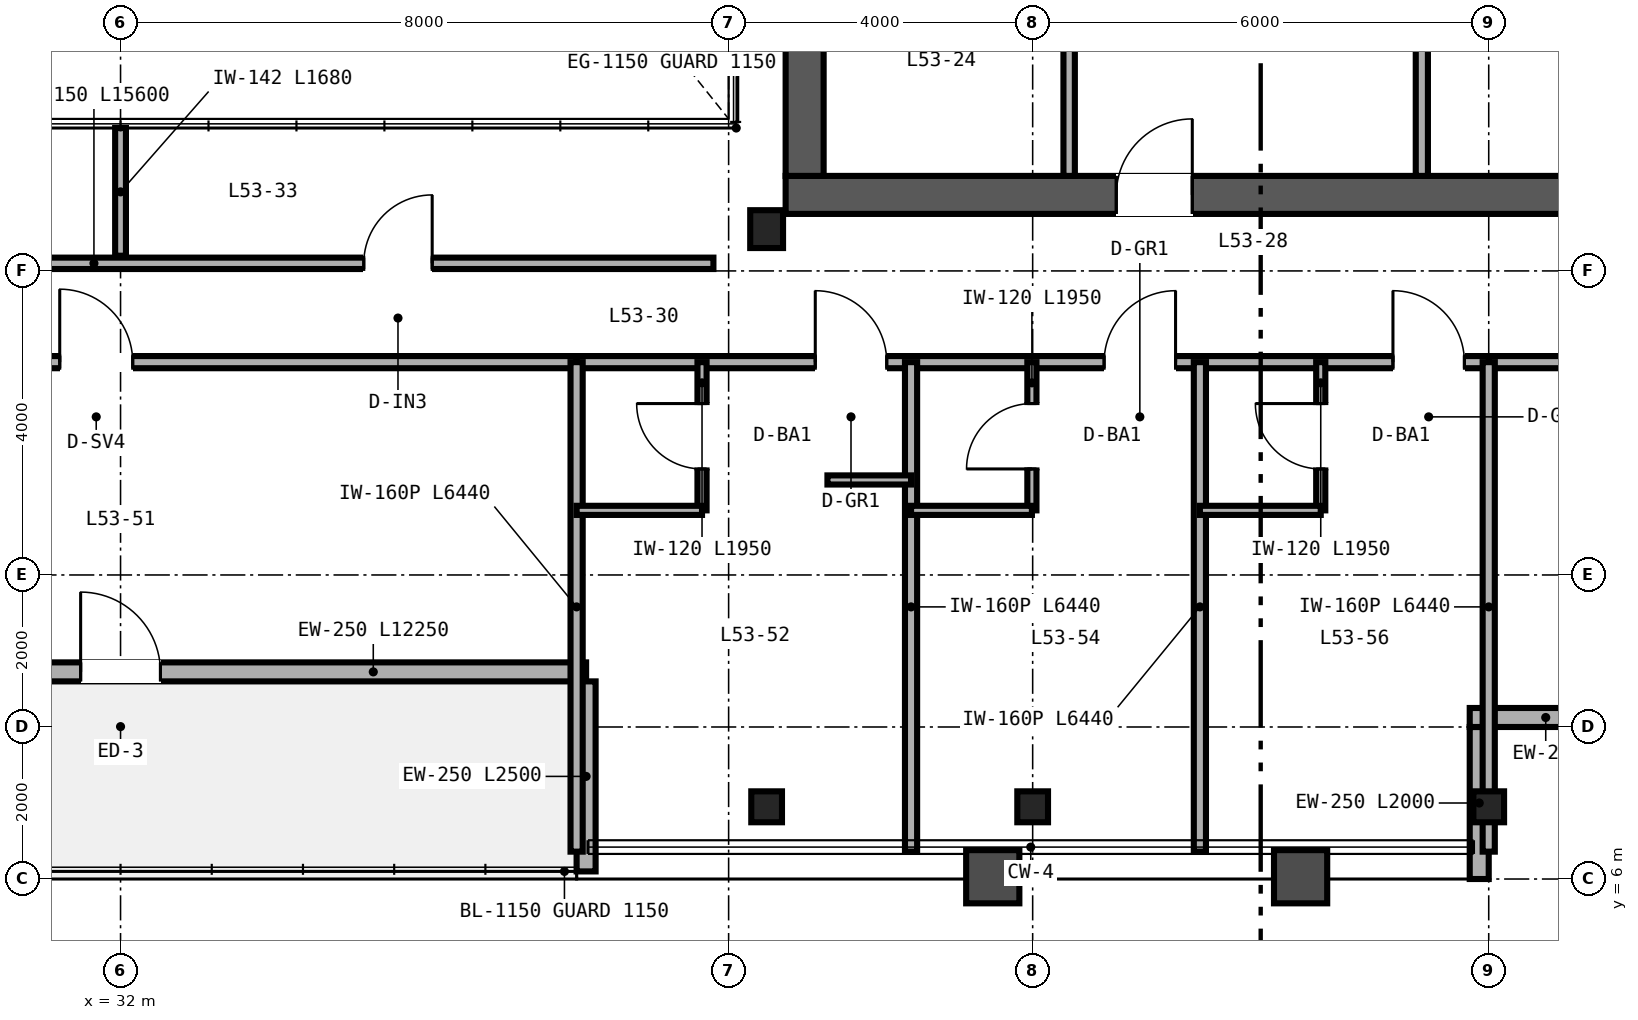
"""IFC4 building model, lengths in metres.
Left out: names, types, materials, properties, quantities, classifications, styles, units other than length and angle.
Written with IfcOpenShell. Run it as: python <this file> out.ifc"""

import sys

from ifc_helpers import new_model, si_unit, direction, frame, frame_2d, origin, origin_2d, place, context, subcontext, project, spatial, rectangle, i_section, extrude, source, transform, mapped, element, fill, save


model = new_model("IFC4")
c1 = context("Model", 3, precision=1e-05, world=origin(), true_north=direction((0.0, 1.0)))
c2 = subcontext(c1, "Body", "Model", "MODEL_VIEW")
j1 = project(units=[si_unit("LENGTHUNIT", "METRE"), si_unit("PLANEANGLEUNIT", "RADIAN")], contexts=[c1])
p1 = place(None, origin())
s1 = spatial("IfcSite", under=j1, at=p1, CompositionType="ELEMENT")
p2 = place(p1, origin())
s2 = spatial("IfcBuilding", under=s1, at=p2, CompositionType="ELEMENT")
p3 = place(p2, frame((0.0, 0.0, 210.0)))
s3 = spatial("IfcBuildingStorey", under=s2, at=p3, CompositionType="ELEMENT", Elevation=210.0)
p4 = place(p3, frame((40.75, 15.0, 0.0), z_axis=(0.0, 0.0, 1.0), x_axis=(1.0, 0.0, 0.0)))
e1 = element("IfcWall", 1, at=p4, inside=s3, PredefinedType="SHEAR", context=c2, shape_type="SweptSolid", body=[
    extrude(rectangle(XDim=12.5, YDim=0.5, at=frame_2d((6.25, 0.0))), origin(), (0.0, 0.0, 1.0), 3.37),
])
p5 = place(p4, frame((4.35, 0.0, 0.0)))
e2 = element("IfcOpeningElement", 2, at=p5, cuts=e1, PredefinedType="OPENING", context=c2, shape_type="SweptSolid", body=[
    extrude(rectangle(XDim=1.0, YDim=2.15, at=frame_2d((0.5, 1.075))), frame((0.0, 0.26, 0.0), z_axis=(0.0, -1.0, 0.0), x_axis=(1.0, 0.0, 0.0)), (0.0, 0.0, 1.0), 0.52),
])
p6 = place(p3, frame((41.0, 15.25, 0.0), z_axis=(0.0, 0.0, 1.0), x_axis=(0.0, 1.0, 0.0)))
e3 = element("IfcWall", 3, at=p6, inside=s3, PredefinedType="SHEAR", context=c2, shape_type="SweptSolid", body=[
    extrude(rectangle(XDim=21.5, YDim=0.5, at=frame_2d((10.75, 0.0))), origin(), (0.0, 0.0, 1.0), 3.37),
])
m1 = source(origin(), c2, "Body", "SweptSolid", [
    extrude(i_section(OverallWidth=0.432, OverallDepth=0.498, WebThickness=0.056, FlangeThickness=0.089, FilletRadius=0.025, at=origin_2d()), origin(), (0.0, 0.0, 1.0), 3.37),
])
p7 = place(p3, frame((40.5, 14.55, 0.0), z_axis=(0.0, 0.0, 1.0), x_axis=(1.0, 0.0, 0.0)))
e4 = element("IfcColumn", 4, at=p7, inside=s3, PredefinedType="COLUMN", context=c2, shape_type="MappedRepresentation", body=[
    mapped(m1, transform((0.0, 0.0, 0.0), scale=1.0)),
])
m2 = source(origin(), c2, "Body", "SweptSolid", [
    extrude(i_section(OverallWidth=0.404, OverallDepth=0.407, WebThickness=0.027, FlangeThickness=0.044, FilletRadius=0.025, at=origin_2d()), origin(), (0.0, 0.0, 1.0), 3.37),
])
for number, where, z_axis, x_axis in (
    (5, (40.5, 6.95, 0.0), (0.0, 0.0, 1.0), (1.0, 0.0, 0.0)),
    (6, (44.0, 6.95, 0.0), (0.0, 0.0, 1.0), (1.0, 0.0, 0.0)),
    (7, (50.0, 6.95, 0.0), (0.0, 0.0, 1.0), (1.0, 0.0, 0.0)),
):
    element("IfcColumn", number, at=place(p3, frame(where, z_axis=z_axis, x_axis=x_axis)), inside=s3, PredefinedType="COLUMN", context=c2, shape_type="MappedRepresentation", body=[
        mapped(m2, transform((0.0, 0.0, 0.0), scale=1.0)),
    ])
p8 = place(p3, frame((49.875, 6.0, 0.0), z_axis=(0.0, 0.0, 1.0), x_axis=(0.0, 1.0, 0.0)))
e8 = element("IfcWall", 8, at=p8, inside=s3, PredefinedType="SOLIDWALL", context=c2, shape_type="SweptSolid", body=[
    extrude(rectangle(XDim=2.0, YDim=0.25, at=frame_2d((1.0, 0.0))), origin(), (0.0, 0.0, 1.0), 2.677),
])
p9 = place(p3, frame((49.75, 8.125, 0.0), z_axis=(0.0, 0.0, 1.0), x_axis=(1.0, 0.0, 0.0)))
e9 = element("IfcWall", 9, at=p9, inside=s3, PredefinedType="SOLIDWALL", context=c2, shape_type="SweptSolid", body=[
    extrude(rectangle(XDim=2.0, YDim=0.25, at=frame_2d((1.0, 0.0))), origin(), (0.0, 0.0, 1.0), 3.37),
])
p10 = place(p3, frame((25.875, 8.725, 0.0), z_axis=(0.0, 0.0, 1.0), x_axis=(1.0, 0.0, 0.0)))
e10 = element("IfcWall", 10, at=p10, inside=s3, PredefinedType="SOLIDWALL", context=c2, shape_type="SweptSolid", body=[
    extrude(rectangle(XDim=12.25, YDim=0.25, at=frame_2d((6.125, 0.0))), origin(), (0.0, 0.0, 1.0), 3.37),
])
p11 = place(p10, frame((5.6, 0.0, 0.0)))
e11 = element("IfcOpeningElement", 11, at=p11, cuts=e10, PredefinedType="OPENING", context=c2, shape_type="SweptSolid", body=[
    extrude(rectangle(XDim=1.05, YDim=2.15, at=frame_2d((0.525, 1.075))), frame((0.0, 0.135, 0.0), z_axis=(0.0, -1.0, 0.0), x_axis=(1.0, 0.0, 0.0)), (0.0, 0.0, 1.0), 0.27),
])
p12 = place(p3, frame((38.125, 6.1, 0.0), z_axis=(0.0, 0.0, 1.0), x_axis=(0.0, 1.0, 0.0)))
e12 = element("IfcWall", 12, at=p12, inside=s3, PredefinedType="SOLIDWALL", context=c2, shape_type="SweptSolid", body=[
    extrude(rectangle(XDim=2.5, YDim=0.25, at=frame_2d((1.25, 0.0))), origin(), (0.0, 0.0, 1.0), 2.443),
])
p13 = place(p3, frame((49.12, 15.25, 0.0), z_axis=(0.0, 0.0, 1.0), x_axis=(0.0, 1.0, 0.0)))
e13 = element("IfcWall", 13, at=p13, inside=s3, PredefinedType="PARTITIONING", context=c2, shape_type="SweptSolid", body=[
    extrude(rectangle(XDim=16.13, YDim=0.16, at=frame_2d((8.065, 0.0))), origin(), (0.0, 0.0, 1.0), 2.443),
])
p14 = place(p13, frame((2.2, 0.0, 0.0)))
e14 = element("IfcOpeningElement", 14, at=p14, cuts=e13, PredefinedType="OPENING", context=c2, shape_type="SweptSolid", body=[
    extrude(rectangle(XDim=0.9, YDim=2.15, at=frame_2d((0.45, 1.075))), frame((0.0, 0.09, 0.0), z_axis=(0.0, -1.0, 0.0), x_axis=(1.0, 0.0, 0.0)), (0.0, 0.0, 1.0), 0.18),
])
p15 = place(p13, frame((8.2, 0.0, 0.0)))
e15 = element("IfcOpeningElement", 15, at=p15, cuts=e13, PredefinedType="OPENING", context=c2, shape_type="SweptSolid", body=[
    extrude(rectangle(XDim=0.9, YDim=2.15, at=frame_2d((0.45, 1.075))), frame((0.0, 0.09, 0.0), z_axis=(0.0, -1.0, 0.0), x_axis=(1.0, 0.0, 0.0)), (0.0, 0.0, 1.0), 0.18),
])
p16 = place(p13, frame((13.5, 0.0, 0.0)))
e16 = element("IfcOpeningElement", 16, at=p16, cuts=e13, PredefinedType="OPENING", context=c2, shape_type="SweptSolid", body=[
    extrude(rectangle(XDim=0.9, YDim=2.15, at=frame_2d((0.45, 1.075))), frame((0.0, 0.09, 0.0), z_axis=(0.0, -1.0, 0.0), x_axis=(1.0, 0.0, 0.0)), (0.0, 0.0, 1.0), 0.18),
])
p17 = place(p3, frame((44.48, 15.25, 0.0), z_axis=(0.0, 0.0, 1.0), x_axis=(0.0, 1.0, 0.0)))
e17 = element("IfcWall", 17, at=p17, inside=s3, PredefinedType="PARTITIONING", context=c2, shape_type="SweptSolid", body=[
    extrude(rectangle(XDim=11.63, YDim=0.15, at=frame_2d((5.815, 0.0))), origin(), (0.0, 0.0, 1.0), 3.37),
])
p18 = place(p17, frame((2.2, 0.0, 0.0)))
e18 = element("IfcOpeningElement", 18, at=p18, cuts=e17, PredefinedType="OPENING", context=c2, shape_type="SweptSolid", body=[
    extrude(rectangle(XDim=0.9, YDim=2.15, at=frame_2d((0.45, 1.075))), frame((0.0, 0.085, 0.0), z_axis=(0.0, -1.0, 0.0), x_axis=(1.0, 0.0, 0.0)), (0.0, 0.0, 1.0), 0.17),
])
p19 = place(p17, frame((7.87, 0.0, 0.0)))
e19 = element("IfcOpeningElement", 19, at=p19, cuts=e17, PredefinedType="OPENING", context=c2, shape_type="SweptSolid", body=[
    extrude(rectangle(XDim=0.9, YDim=2.15, at=frame_2d((0.45, 1.075))), frame((0.0, 0.085, 0.0), z_axis=(0.0, -1.0, 0.0), x_axis=(1.0, 0.0, 0.0)), (0.0, 0.0, 1.0), 0.17),
])
p20 = place(p3, frame((24.2, 14.1, 0.0), z_axis=(0.0, 0.0, 1.0), x_axis=(1.0, 0.0, 0.0)))
e20 = element("IfcWall", 20, at=p20, inside=s3, PredefinedType="PARTITIONING", context=c2, shape_type="SweptSolid", body=[
    extrude(rectangle(XDim=15.6, YDim=0.15, at=frame_2d((7.8, 0.0))), origin(), (0.0, 0.0, 1.0), 3.37),
])
p21 = place(p20, frame((3.0, 0.0, 0.0)))
e21 = element("IfcOpeningElement", 21, at=p21, cuts=e20, PredefinedType="OPENING", context=c2, shape_type="SweptSolid", body=[
    extrude(rectangle(XDim=0.9, YDim=2.15, at=frame_2d((0.45, 1.075))), frame((0.0, 0.085, 0.0), z_axis=(0.0, -1.0, 0.0), x_axis=(1.0, 0.0, 0.0)), (0.0, 0.0, 1.0), 0.17),
])
p22 = place(p20, frame((11.0, 0.0, 0.0)))
e22 = element("IfcOpeningElement", 22, at=p22, cuts=e20, PredefinedType="OPENING", context=c2, shape_type="SweptSolid", body=[
    extrude(rectangle(XDim=0.9, YDim=2.15, at=frame_2d((0.45, 1.075))), frame((0.0, 0.085, 0.0), z_axis=(0.0, -1.0, 0.0), x_axis=(1.0, 0.0, 0.0)), (0.0, 0.0, 1.0), 0.17),
])
p23 = place(p3, frame((32.0, 14.2, 0.0), z_axis=(0.0, 0.0, 1.0), x_axis=(0.0, 1.0, 0.0)))
e23 = element("IfcWall", 23, at=p23, inside=s3, PredefinedType="PARTITIONING", context=c2, shape_type="SweptSolid", body=[
    extrude(rectangle(XDim=1.68, YDim=0.142, at=frame_2d((0.84, 0.0))), origin(), (0.0, 0.0, 1.0), 3.37),
])
p24 = place(p3, frame((50.0, 12.8, 0.0), z_axis=(0.0, 0.0, 1.0), x_axis=(1.0, 0.0, 0.0)))
e24 = element("IfcWall", 24, at=p24, inside=s3, PredefinedType="PARTITIONING", context=c2, shape_type="SweptSolid", body=[
    extrude(rectangle(XDim=4.0, YDim=0.16, at=frame_2d((2.0, 0.0))), origin(), (0.0, 0.0, 1.0), 3.37),
])
p25 = place(p24, frame((1.52, 0.0, 0.0)))
e25 = element("IfcOpeningElement", 25, at=p25, cuts=e24, PredefinedType="OPENING", context=c2, shape_type="SweptSolid", body=[
    extrude(rectangle(XDim=0.96, YDim=2.15, at=frame_2d((0.48, 1.075))), frame((0.0, 0.09, 0.0), z_axis=(0.0, -1.0, 0.0), x_axis=(1.0, 0.0, 0.0)), (0.0, 0.0, 1.0), 0.18),
])
p26 = place(p3, frame((26.0, 12.8, 0.0), z_axis=(0.0, 0.0, 1.0), x_axis=(1.0, 0.0, 0.0)))
e26 = element("IfcWall", 26, at=p26, inside=s3, PredefinedType="PARTITIONING", context=c2, shape_type="SweptSolid", body=[
    extrude(rectangle(XDim=12.0, YDim=0.16, at=frame_2d((6.0, 0.0))), origin(), (0.0, 0.0, 1.0), 3.37),
])
p27 = place(p26, frame((5.2, 0.0, 0.0)))
e27 = element("IfcOpeningElement", 27, at=p27, cuts=e26, PredefinedType="OPENING", context=c2, shape_type="SweptSolid", body=[
    extrude(rectangle(XDim=0.96, YDim=2.15, at=frame_2d((0.48, 1.075))), frame((0.0, 0.09, 0.0), z_axis=(0.0, -1.0, 0.0), x_axis=(1.0, 0.0, 0.0)), (0.0, 0.0, 1.0), 0.18),
])
p28 = place(p3, frame((38.0, 12.8, 0.0), z_axis=(0.0, 0.0, 1.0), x_axis=(1.0, 0.0, 0.0)))
e28 = element("IfcWall", 28, at=p28, inside=s3, PredefinedType="PARTITIONING", context=c2, shape_type="SweptSolid", body=[
    extrude(rectangle(XDim=12.0, YDim=0.16, at=frame_2d((6.0, 0.0))), origin(), (0.0, 0.0, 1.0), 2.913),
])
p29 = place(p28, frame((3.14, 0.0, 0.0)))
e29 = element("IfcOpeningElement", 29, at=p29, cuts=e28, PredefinedType="OPENING", context=c2, shape_type="SweptSolid", body=[
    extrude(rectangle(XDim=0.94, YDim=2.15, at=frame_2d((0.47, 1.075))), frame((0.0, 0.09, 0.0), z_axis=(0.0, -1.0, 0.0), x_axis=(1.0, 0.0, 0.0)), (0.0, 0.0, 1.0), 0.18),
])
p30 = place(p28, frame((6.94, 0.0, 0.0)))
e30 = element("IfcOpeningElement", 30, at=p30, cuts=e28, PredefinedType="OPENING", context=c2, shape_type="SweptSolid", body=[
    extrude(rectangle(XDim=0.94, YDim=2.15, at=frame_2d((0.47, 1.075))), frame((0.0, 0.09, 0.0), z_axis=(0.0, -1.0, 0.0), x_axis=(1.0, 0.0, 0.0)), (0.0, 0.0, 1.0), 0.18),
])
p31 = place(p28, frame((10.74, 0.0, 0.0)))
e31 = element("IfcOpeningElement", 31, at=p31, cuts=e28, PredefinedType="OPENING", context=c2, shape_type="SweptSolid", body=[
    extrude(rectangle(XDim=0.94, YDim=2.15, at=frame_2d((0.47, 1.075))), frame((0.0, 0.09, 0.0), z_axis=(0.0, -1.0, 0.0), x_axis=(1.0, 0.0, 0.0)), (0.0, 0.0, 1.0), 0.18),
])
p32 = place(p3, frame((38.0, 6.36, 0.0), z_axis=(0.0, 0.0, 1.0), x_axis=(0.0, 1.0, 0.0)))
e32 = element("IfcWall", 32, at=p32, inside=s3, PredefinedType="PARTITIONING", context=c2, shape_type="SweptSolid", body=[
    extrude(rectangle(XDim=6.44, YDim=0.16, at=frame_2d((3.22, 0.0))), origin(), (0.0, 0.0, 1.0), 2.443),
])
p33 = place(p3, frame((50.0, 6.36, 0.0), z_axis=(0.0, 0.0, 1.0), x_axis=(0.0, 1.0, 0.0)))
e33 = element("IfcWall", 33, at=p33, inside=s3, PredefinedType="PARTITIONING", context=c2, shape_type="SweptSolid", body=[
    extrude(rectangle(XDim=6.44, YDim=0.16, at=frame_2d((3.22, 0.0))), origin(), (0.0, 0.0, 1.0), 2.677),
])
p34 = place(p3, frame((42.4, 6.36, 0.0), z_axis=(0.0, 0.0, 1.0), x_axis=(0.0, 1.0, 0.0)))
e34 = element("IfcWall", 34, at=p34, inside=s3, PredefinedType="PARTITIONING", context=c2, shape_type="SweptSolid", body=[
    extrude(rectangle(XDim=6.44, YDim=0.16, at=frame_2d((3.22, 0.0))), origin(), (0.0, 0.0, 1.0), 2.833),
])
p35 = place(p3, frame((39.65, 10.85, 0.0), z_axis=(0.0, 0.0, 1.0), x_axis=(0.0, 1.0, 0.0)))
e35 = element("IfcWall", 35, at=p35, inside=s3, PredefinedType="PARTITIONING", context=c2, shape_type="SweptSolid", body=[
    extrude(rectangle(XDim=1.95, YDim=0.12, at=frame_2d((0.975, 0.0))), origin(), (0.0, 0.0, 1.0), 3.37),
])
p36 = place(p35, frame((0.545, 0.0, 0.0)))
e36 = element("IfcOpeningElement", 36, at=p36, cuts=e35, PredefinedType="OPENING", context=c2, shape_type="SweptSolid", body=[
    extrude(rectangle(XDim=0.86, YDim=2.1, at=frame_2d((0.43, 1.05))), frame((0.0, 0.07, 0.0), z_axis=(0.0, -1.0, 0.0), x_axis=(1.0, 0.0, 0.0)), (0.0, 0.0, 1.0), 0.14),
])
p37 = place(p3, frame((38.0, 10.85, 0.0), z_axis=(0.0, 0.0, 1.0), x_axis=(1.0, 0.0, 0.0)))
e37 = element("IfcWall", 37, at=p37, inside=s3, PredefinedType="PARTITIONING", context=c2, shape_type="SweptSolid", body=[
    extrude(rectangle(XDim=1.65, YDim=0.12, at=frame_2d((0.825, 0.0))), origin(), (0.0, 0.0, 1.0), 3.37),
])
p38 = place(p3, frame((41.3, 11.25, 0.0), z_axis=(0.0, 0.0, 1.0), x_axis=(1.0, 0.0, 0.0)))
e38 = element("IfcWall", 38, at=p38, inside=s3, PredefinedType="PARTITIONING", context=c2, shape_type="SweptSolid", body=[
    extrude(rectangle(XDim=1.1, YDim=0.12, at=frame_2d((0.55, 0.0))), origin(), (0.0, 0.0, 1.0), 3.37),
])
p39 = place(p3, frame((46.2, 6.36, 0.0), z_axis=(0.0, 0.0, 1.0), x_axis=(0.0, 1.0, 0.0)))
e39 = element("IfcWall", 39, at=p39, inside=s3, PredefinedType="PARTITIONING", context=c2, shape_type="SweptSolid", body=[
    extrude(rectangle(XDim=6.44, YDim=0.16, at=frame_2d((3.22, 0.0))), origin(), (0.0, 0.0, 1.0), 2.677),
])
p40 = place(p3, frame((43.99, 10.85, 0.0), z_axis=(0.0, 0.0, 1.0), x_axis=(0.0, 1.0, 0.0)))
e40 = element("IfcWall", 40, at=p40, inside=s3, PredefinedType="PARTITIONING", context=c2, shape_type="SweptSolid", body=[
    extrude(rectangle(XDim=1.95, YDim=0.12, at=frame_2d((0.975, 0.0))), origin(), (0.0, 0.0, 1.0), 3.37),
])
p41 = place(p40, frame((0.545, 0.0, 0.0)))
e41 = element("IfcOpeningElement", 41, at=p41, cuts=e40, PredefinedType="OPENING", context=c2, shape_type="SweptSolid", body=[
    extrude(rectangle(XDim=0.86, YDim=2.1, at=frame_2d((0.43, 1.05))), frame((0.0, 0.07, 0.0), z_axis=(0.0, -1.0, 0.0), x_axis=(1.0, 0.0, 0.0)), (0.0, 0.0, 1.0), 0.14),
])
p42 = place(p3, frame((42.4, 10.85, 0.0), z_axis=(0.0, 0.0, 1.0), x_axis=(1.0, 0.0, 0.0)))
e42 = element("IfcWall", 42, at=p42, inside=s3, PredefinedType="PARTITIONING", context=c2, shape_type="SweptSolid", body=[
    extrude(rectangle(XDim=1.59, YDim=0.12, at=frame_2d((0.795, 0.0))), origin(), (0.0, 0.0, 1.0), 3.37),
])
p43 = place(p3, frame((47.79, 10.85, 0.0), z_axis=(0.0, 0.0, 1.0), x_axis=(0.0, 1.0, 0.0)))
e43 = element("IfcWall", 43, at=p43, inside=s3, PredefinedType="PARTITIONING", context=c2, shape_type="SweptSolid", body=[
    extrude(rectangle(XDim=1.95, YDim=0.12, at=frame_2d((0.975, 0.0))), origin(), (0.0, 0.0, 1.0), 3.37),
])
p44 = place(p43, frame((0.545, 0.0, 0.0)))
e44 = element("IfcOpeningElement", 44, at=p44, cuts=e43, PredefinedType="OPENING", context=c2, shape_type="SweptSolid", body=[
    extrude(rectangle(XDim=0.86, YDim=2.1, at=frame_2d((0.43, 1.05))), frame((0.0, 0.07, 0.0), z_axis=(0.0, -1.0, 0.0), x_axis=(1.0, 0.0, 0.0)), (0.0, 0.0, 1.0), 0.14),
])
p45 = place(p3, frame((46.2, 10.85, 0.0), z_axis=(0.0, 0.0, 1.0), x_axis=(1.0, 0.0, 0.0)))
e45 = element("IfcWall", 45, at=p45, inside=s3, PredefinedType="PARTITIONING", context=c2, shape_type="SweptSolid", body=[
    extrude(rectangle(XDim=1.59, YDim=0.12, at=frame_2d((0.795, 0.0))), origin(), (0.0, 0.0, 1.0), 3.37),
])
m3 = source(origin(), c2, "Body", "SweptSolid", [
    extrude(rectangle(XDim=1.05, YDim=2.15, at=frame_2d((0.525, 1.075))), frame((0.0, 0.025, 0.0), z_axis=(0.0, -1.0, 0.0), x_axis=(1.0, 0.0, 0.0)), (0.0, 0.0, 1.0), 0.05),
])
p46 = place(p11, origin())
e46 = element("IfcDoor", 46, at=p46, inside=s3, OperationType="SINGLE_SWING_LEFT", PredefinedType="DOOR", context=c2, shape_type="MappedRepresentation", body=[
    mapped(m3, transform((0.0, 0.0, 0.0), scale=1.0)),
])
fill(e11, e46)
m4 = source(origin(), c2, "Body", "SweptSolid", [
    extrude(rectangle(XDim=1.0, YDim=2.15, at=frame_2d((0.5, 1.075))), frame((0.0, 0.025, 0.0), z_axis=(0.0, -1.0, 0.0), x_axis=(1.0, 0.0, 0.0)), (0.0, 0.0, 1.0), 0.05),
])
p47 = place(p5, origin())
e47 = element("IfcDoor", 47, at=p47, inside=s3, OperationType="SINGLE_SWING_RIGHT", PredefinedType="DOOR", context=c2, shape_type="MappedRepresentation", body=[
    mapped(m4, transform((0.0, 0.0, 0.0), scale=1.0)),
])
fill(e2, e47)
m5 = source(origin(), c2, "Body", "SweptSolid", [
    extrude(rectangle(XDim=0.9, YDim=2.15, at=frame_2d((0.45, 1.075))), frame((0.0, 0.025, 0.0), z_axis=(0.0, -1.0, 0.0), x_axis=(1.0, 0.0, 0.0)), (0.0, 0.0, 1.0), 0.05),
])
p48 = place(p22, origin())
e48 = element("IfcDoor", 48, at=p48, inside=s3, OperationType="SINGLE_SWING_RIGHT", PredefinedType="DOOR", context=c2, shape_type="MappedRepresentation", body=[
    mapped(m5, transform((0.0, 0.0, 0.0), scale=1.0)),
])
fill(e22, e48)
m6 = source(origin(), c2, "Body", "SweptSolid", [
    extrude(rectangle(XDim=0.96, YDim=2.15, at=frame_2d((0.48, 1.075))), frame((0.0, 0.025, 0.0), z_axis=(0.0, -1.0, 0.0), x_axis=(1.0, 0.0, 0.0)), (0.0, 0.0, 1.0), 0.05),
])
p49 = place(p27, origin())
e49 = element("IfcDoor", 49, at=p49, inside=s3, OperationType="SINGLE_SWING_LEFT", PredefinedType="DOOR", context=c2, shape_type="MappedRepresentation", body=[
    mapped(m6, transform((0.0, 0.0, 0.0), scale=1.0)),
])
fill(e27, e49)
m7 = source(origin(), c2, "Body", "SweptSolid", [
    extrude(rectangle(XDim=0.86, YDim=2.1, at=frame_2d((0.43, 1.05))), frame((0.0, 0.025, 0.0), z_axis=(0.0, -1.0, 0.0), x_axis=(1.0, 0.0, 0.0)), (0.0, 0.0, 1.0), 0.05),
])
p50 = place(p36, origin())
e50 = element("IfcDoor", 50, at=p50, inside=s3, OperationType="SINGLE_SWING_RIGHT", PredefinedType="DOOR", context=c2, shape_type="MappedRepresentation", body=[
    mapped(m7, transform((0.0, 0.0, 0.0), scale=1.0)),
])
fill(e36, e50)
p51 = place(p41, origin())
e51 = element("IfcDoor", 51, at=p51, inside=s3, OperationType="SINGLE_SWING_LEFT", PredefinedType="DOOR", context=c2, shape_type="MappedRepresentation", body=[
    mapped(m7, transform((0.0, 0.0, 0.0), scale=1.0)),
])
fill(e41, e51)
p52 = place(p44, origin())
e52 = element("IfcDoor", 52, at=p52, inside=s3, OperationType="SINGLE_SWING_RIGHT", PredefinedType="DOOR", context=c2, shape_type="MappedRepresentation", body=[
    mapped(m7, transform((0.0, 0.0, 0.0), scale=1.0)),
])
fill(e44, e52)
m8 = source(origin(), c2, "Body", "SweptSolid", [
    extrude(rectangle(XDim=0.94, YDim=2.15, at=frame_2d((0.47, 1.075))), frame((0.0, 0.025, 0.0), z_axis=(0.0, -1.0, 0.0), x_axis=(1.0, 0.0, 0.0)), (0.0, 0.0, 1.0), 0.05),
])
p53 = place(p29, origin())
e53 = element("IfcDoor", 53, at=p53, inside=s3, OperationType="SINGLE_SWING_LEFT", PredefinedType="DOOR", context=c2, shape_type="MappedRepresentation", body=[
    mapped(m8, transform((0.0, 0.0, 0.0), scale=1.0)),
])
fill(e29, e53)
p54 = place(p30, origin())
e54 = element("IfcDoor", 54, at=p54, inside=s3, OperationType="SINGLE_SWING_RIGHT", PredefinedType="DOOR", context=c2, shape_type="MappedRepresentation", body=[
    mapped(m8, transform((0.0, 0.0, 0.0), scale=1.0)),
])
fill(e30, e54)
p55 = place(p31, origin())
e55 = element("IfcDoor", 55, at=p55, inside=s3, OperationType="SINGLE_SWING_LEFT", PredefinedType="DOOR", context=c2, shape_type="MappedRepresentation", body=[
    mapped(m8, transform((0.0, 0.0, 0.0), scale=1.0)),
])
fill(e31, e55)
save(model, sys.argv[1])
